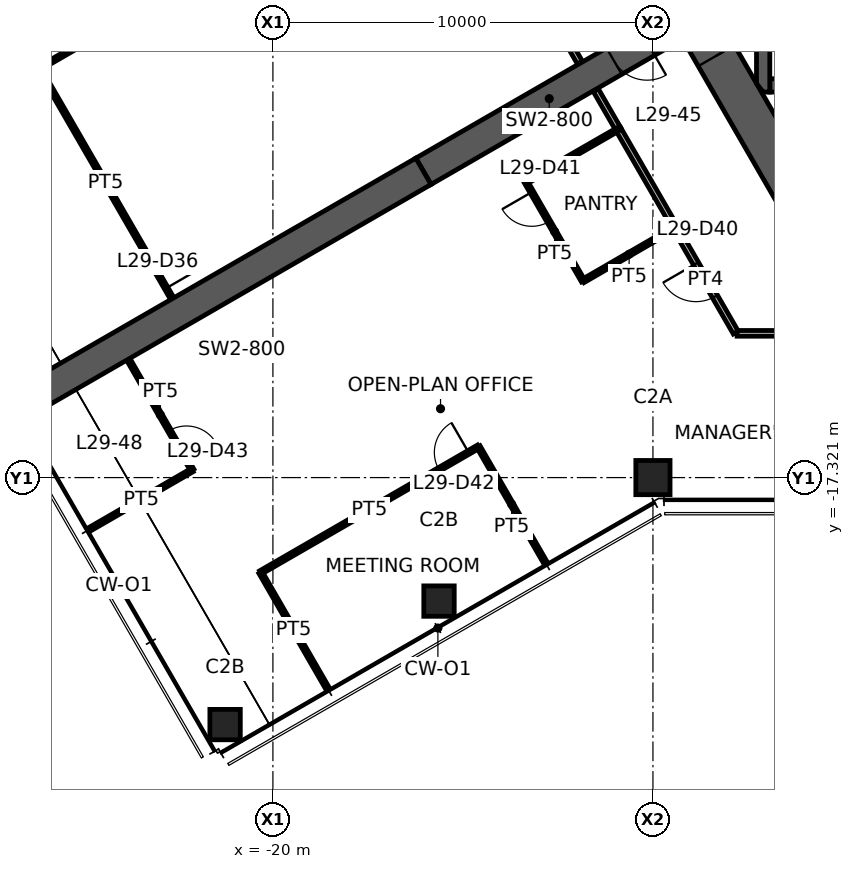
"""IFC4 building model, lengths in metres.
Left out: names, types, materials, properties, quantities, classifications, styles, units other than length and angle.
Written with IfcOpenShell. Run it as: python <this file> out.ifc"""

import sys

from ifc_helpers import new_model, si_unit, direction, frame, frame_2d, origin, origin_2d, place, context, subcontext, project, spatial, polyline, rectangle, hollow_rectangle, outline, extrude, element, fill, save


model = new_model("IFC4")
c1 = context("Model", 3, precision=1e-05, world=origin(), true_north=direction((0.0, 1.0)))
c2 = subcontext(c1, "Body", "Model", "MODEL_VIEW")
j1 = project(units=[si_unit("LENGTHUNIT", "METRE"), si_unit("PLANEANGLEUNIT", "RADIAN")], contexts=[c1])
p1 = place(None, origin())
s1 = spatial("IfcSite", under=j1, at=p1, CompositionType="ELEMENT")
p2 = place(p1, origin())
s2 = spatial("IfcBuilding", under=s1, at=p2, CompositionType="ELEMENT")
p3 = place(p2, frame((0.0, 0.0, 115.8)))
s3 = spatial("IfcBuildingStorey", under=s2, at=p3, CompositionType="ELEMENT", Elevation=115.8)
p4 = place(p3, frame((-10.0, -17.321, 0.0), z_axis=(0.0, 0.0, 1.0), x_axis=(1.0, 0.0, 0.0)))
e1 = element("IfcColumn", 1, at=p4, inside=s3, PredefinedType="COLUMN", context=c2, shape_type="SweptSolid", body=[
    extrude(hollow_rectangle(XDim=0.9, YDim=0.9, WallThickness=0.055, at=origin_2d()), origin(), (0.0, 0.0, 1.0), 3.9),
])
for number, where, z_axis, x_axis in (
    (2, (-15.629, -20.571, 0.0), (0.0, 0.0, 1.0), (1.0, 0.0, 0.0)),
    (3, (-21.258, -23.821, 0.0), (0.0, 0.0, 1.0), (1.0, 0.0, 0.0)),
):
    element("IfcColumn", number, at=place(p3, frame(where, z_axis=z_axis, x_axis=x_axis)), inside=s3, PredefinedType="COLUMN", context=c2, shape_type="SweptSolid", body=[
        extrude(hollow_rectangle(XDim=0.8, YDim=0.8, WallThickness=0.045, at=origin_2d()), origin(), (0.0, 0.0, 1.0), 3.9),
    ])
p5 = place(p3, frame((-11.922, 0.0, 0.0), z_axis=(0.0, 0.0, 1.0), x_axis=(0.500004296715, -0.866022923061, 0.0)))
e4 = element("IfcWall", 4, at=p5, inside=s3, PredefinedType="SHEAR", context=c2, shape_type="SweptSolid", body=[
    extrude(outline(polyline([(-0.318, -0.55), (6.381, -0.55), (7.181, -0.55), (12.24, -0.55), (11.605, 0.55), (7.181, 0.55), (6.381, 0.55), (0.318, 0.55), (-0.318, -0.55)])), origin(), (0.0, 0.0, 1.0), 3.9),
])
p6 = place(p5, frame((6.381, 0.0, 0.0)))
e5 = element("IfcOpeningElement", 5, at=p6, cuts=e4, PredefinedType="OPENING", context=c2, shape_type="SweptSolid", body=[
    extrude(rectangle(XDim=0.8, YDim=2.1, at=frame_2d((0.4, 1.05))), frame((0.0, 0.56, 0.0), z_axis=(0.0, -1.0, 0.0), x_axis=(1.0, 0.0, 0.0)), (0.0, 0.0, 1.0), 1.12),
])
p7 = place(p3, frame((-9.418, -5.438, 0.0), z_axis=(0.0, 0.0, 1.0), x_axis=(-0.866029782078, -0.499992416496, 0.0)))
e6 = element("IfcWall", 6, at=p7, inside=s3, PredefinedType="SHEAR", context=c2, shape_type="SweptSolid", body=[
    extrude(rectangle(XDim=7.646, YDim=0.8, at=frame_2d((3.823, 0.0))), origin(), (0.0, 0.0, 1.0), 3.9),
])
p8 = place(p7, frame((0.85, 0.0, 0.0)))
e7 = element("IfcOpeningElement", 7, at=p8, cuts=e6, PredefinedType="OPENING", context=c2, shape_type="SweptSolid", body=[
    extrude(rectangle(XDim=1.0, YDim=2.1, at=frame_2d((0.5, 1.05))), frame((0.0, 0.41, 0.0), z_axis=(0.0, -1.0, 0.0), x_axis=(1.0, 0.0, 0.0)), (0.0, 0.0, 1.0), 0.82),
])
p9 = place(p3, frame((-16.039, -9.26, 0.0), z_axis=(0.0, 0.0, 1.0), x_axis=(-0.866024837091, -0.50000098154, 0.0)))
e8 = element("IfcWall", 8, at=p9, inside=s3, PredefinedType="SHEAR", context=c2, shape_type="SweptSolid", body=[
    extrude(rectangle(XDim=13.0, YDim=0.8, at=frame_2d((6.5, 0.0))), origin(), (0.0, 0.0, 1.0), 3.9),
])
p10 = place(p3, frame((-6.925, -7.0, 0.0), z_axis=(0.0, 0.0, 1.0), x_axis=(1.0, 0.0, 0.0)))
e9 = element("IfcWall", 9, at=p10, inside=s3, PredefinedType="SHEAR", context=c2, shape_type="SweptSolid", body=[
    extrude(rectangle(XDim=2.25, YDim=0.35, at=frame_2d((1.125, 0.0))), origin(), (0.0, 0.0, 1.0), 3.9),
])
p11 = place(p3, frame((-7.1, -3.775, 0.0), z_axis=(0.0, 0.0, 1.0), x_axis=(0.0, -1.0, 0.0)))
e10 = element("IfcWall", 10, at=p11, inside=s3, PredefinedType="SHEAR", context=c2, shape_type="SweptSolid", body=[
    extrude(outline(polyline([(0.0, -0.175), (3.175, -0.175), (3.4, 0.0), (3.4, 0.175), (0.0, 0.175), (0.0, -0.175)])), origin(), (0.0, 0.0, 1.0), 3.9),
])
p12 = place(p3, frame((-11.923, -6.399, 0.0), z_axis=(0.0, 0.0, 1.0), x_axis=(-0.499980837837, 0.866036466782, 0.0)))
e11 = element("IfcWall", 11, at=p12, inside=s3, PredefinedType="PARTITIONING", context=c2, shape_type="SweptSolid", body=[
    extrude(rectangle(XDim=7.388, YDim=0.15, at=frame_2d((3.694, 0.0))), origin(), (0.0, 0.0, 1.0), 2.95),
])
p13 = place(p12, frame((3.194, 0.0, 0.0)))
e12 = element("IfcOpeningElement", 12, at=p13, cuts=e11, PredefinedType="OPENING", context=c2, shape_type="SweptSolid", body=[
    extrude(rectangle(XDim=1.0, YDim=2.1, at=frame_2d((0.5, 1.05))), frame((0.0, 0.085, 0.0), z_axis=(0.0, -1.0, 0.0), x_axis=(1.0, 0.0, 0.0)), (0.0, 0.0, 1.0), 0.17),
])
p14 = place(p3, frame((-26.151, -6.554, 0.0), z_axis=(0.0, 0.0, 1.0), x_axis=(0.500528756763, -0.865719910625, 0.0)))
e13 = element("IfcWall", 13, at=p14, inside=s3, PredefinedType="PARTITIONING", context=c2, shape_type="SweptSolid", body=[
    extrude(rectangle(XDim=6.979, YDim=0.1, at=frame_2d((3.49, 0.0))), origin(), (0.0, 0.0, 1.0), 2.95),
])
p15 = place(p14, frame((5.78, 0.0, 0.0)))
e14 = element("IfcOpeningElement", 14, at=p15, cuts=e13, PredefinedType="OPENING", context=c2, shape_type="SweptSolid", body=[
    extrude(rectangle(XDim=0.9, YDim=2.1, at=frame_2d((0.45, 1.05))), frame((0.0, 0.06, 0.0), z_axis=(0.0, -1.0, 0.0), x_axis=(1.0, 0.0, 0.0)), (0.0, 0.0, 1.0), 0.12),
])
p16 = place(p3, frame((-21.792, -4.037, 0.0), z_axis=(0.0, 0.0, 1.0), x_axis=(-0.866037775365, -0.499978571182, 0.0)))
e15 = element("IfcWall", 15, at=p16, inside=s3, PredefinedType="PARTITIONING", context=c2, shape_type="SweptSolid", body=[
    extrude(rectangle(XDim=5.033, YDim=0.1, at=frame_2d((2.517, 0.0))), origin(), (0.0, 0.0, 1.0), 2.95),
])
p17 = place(p16, frame((0.3, 0.0, 0.0)))
e16 = element("IfcOpeningElement", 16, at=p17, cuts=e15, PredefinedType="OPENING", context=c2, shape_type="SweptSolid", body=[
    extrude(rectangle(XDim=0.9, YDim=2.1, at=frame_2d((0.45, 1.05))), frame((0.0, 0.06, 0.0), z_axis=(0.0, -1.0, 0.0), x_axis=(1.0, 0.0, 0.0)), (0.0, 0.0, 1.0), 0.12),
])
p18 = place(p3, frame((-9.41, -10.75, 0.0), z_axis=(0.0, 0.0, 1.0), x_axis=(-0.500038395149, 0.8660032352, 0.0)))
e17 = element("IfcWall", 17, at=p18, inside=s3, PredefinedType="PARTITIONING", context=c2, shape_type="SweptSolid", body=[
    extrude(rectangle(XDim=3.01, YDim=0.15, at=frame_2d((1.505, 0.0))), origin(), (0.0, 0.0, 1.0), 2.95),
])
p19 = place(p3, frame((-10.911, -8.152, 0.0), z_axis=(0.0, 0.0, 1.0), x_axis=(-0.499841408252, 0.866116947413, 0.0)))
e18 = element("IfcWall", 18, at=p19, inside=s3, PredefinedType="PARTITIONING", context=c2, shape_type="SweptSolid", body=[
    extrude(rectangle(XDim=1.185, YDim=0.15, at=frame_2d((0.592, 0.0))), origin(), (0.0, 0.0, 1.0), 2.95),
])
p20 = place(p3, frame((-7.82, -13.505, 0.0), z_axis=(0.0, 0.0, 1.0), x_axis=(-0.499983030129, 0.866035201123, 0.0)))
e19 = element("IfcWall", 19, at=p20, inside=s3, PredefinedType="PARTITIONING", context=c2, shape_type="SweptSolid", body=[
    extrude(rectangle(XDim=3.19, YDim=0.15, at=frame_2d((1.595, 0.0))), origin(), (0.0, 0.0, 1.0), 2.95),
])
p21 = place(p20, frame((1.095, 0.0, 0.0)))
e20 = element("IfcOpeningElement", 20, at=p21, cuts=e19, PredefinedType="OPENING", context=c2, shape_type="SweptSolid", body=[
    extrude(rectangle(XDim=1.0, YDim=2.1, at=frame_2d((0.5, 1.05))), frame((0.0, 0.085, 0.0), z_axis=(0.0, -1.0, 0.0), x_axis=(1.0, 0.0, 0.0)), (0.0, 0.0, 1.0), 0.17),
])
p22 = place(p3, frame((-13.338, -9.548, 0.0), z_axis=(0.0, 0.0, 1.0), x_axis=(0.866833758708, 0.498597267105, 0.0)))
e21 = element("IfcWall", 21, at=p22, inside=s3, PredefinedType="PARTITIONING", context=c2, shape_type="SweptSolid", body=[
    extrude(rectangle(XDim=2.8, YDim=0.1, at=frame_2d((1.4, 0.0))), origin(), (0.0, 0.0, 1.0), 2.95),
])
p23 = place(p3, frame((-11.838, -12.146, 0.0), z_axis=(0.0, 0.0, 1.0), x_axis=(-0.499990139034, 0.866031096941, 0.0)))
e22 = element("IfcWall", 22, at=p23, inside=s3, PredefinedType="PARTITIONING", context=c2, shape_type="SweptSolid", body=[
    extrude(rectangle(XDim=3.0, YDim=0.1, at=frame_2d((1.5, 0.0))), origin(), (0.0, 0.0, 1.0), 2.95),
])
p24 = place(p23, frame((1.8, 0.0, 0.0)))
e23 = element("IfcOpeningElement", 23, at=p24, cuts=e22, PredefinedType="OPENING", context=c2, shape_type="SweptSolid", body=[
    extrude(rectangle(XDim=0.9, YDim=2.1, at=frame_2d((0.45, 1.05))), frame((0.0, 0.06, 0.0), z_axis=(0.0, -1.0, 0.0), x_axis=(1.0, 0.0, 0.0)), (0.0, 0.0, 1.0), 0.12),
])
p25 = place(p3, frame((-9.415, -10.742, 0.0), z_axis=(0.0, 0.0, 1.0), x_axis=(-0.865195372903, -0.501434907746, 0.0)))
e24 = element("IfcWall", 24, at=p25, inside=s3, PredefinedType="PARTITIONING", context=c2, shape_type="SweptSolid", body=[
    extrude(rectangle(XDim=2.8, YDim=0.1, at=frame_2d((1.4, 0.0))), origin(), (0.0, 0.0, 1.0), 2.95),
])
p26 = place(p3, frame((-20.325, -19.817, 0.0), z_axis=(0.0, 0.0, 1.0), x_axis=(0.866037567856, 0.499978930619, 0.0)))
e25 = element("IfcWall", 25, at=p26, inside=s3, PredefinedType="PARTITIONING", context=c2, shape_type="SweptSolid", body=[
    extrude(rectangle(XDim=6.619, YDim=0.1, at=frame_2d((3.31, 0.0))), origin(), (0.0, 0.0, 1.0), 2.95),
])
p27 = place(p26, frame((5.42, 0.0, 0.0)))
e26 = element("IfcOpeningElement", 26, at=p27, cuts=e25, PredefinedType="OPENING", context=c2, shape_type="SweptSolid", body=[
    extrude(rectangle(XDim=0.9, YDim=2.1, at=frame_2d((0.45, 1.05))), frame((0.0, 0.06, 0.0), z_axis=(0.0, -1.0, 0.0), x_axis=(1.0, 0.0, 0.0)), (0.0, 0.0, 1.0), 0.12),
])
p28 = place(p3, frame((-18.585, -22.831, 0.0), z_axis=(0.0, 0.0, 1.0), x_axis=(-0.499979528911, 0.866037222451, 0.0)))
e27 = element("IfcWall", 27, at=p28, inside=s3, PredefinedType="PARTITIONING", context=c2, shape_type="SweptSolid", body=[
    extrude(rectangle(XDim=3.48, YDim=0.1, at=frame_2d((1.74, 0.0))), origin(), (0.0, 0.0, 1.0), 2.95),
])
p29 = place(p3, frame((-14.592, -16.508, 0.0), z_axis=(0.0, 0.0, 1.0), x_axis=(0.500010275428, -0.866019471182, 0.0)))
e28 = element("IfcWall", 28, at=p29, inside=s3, PredefinedType="PARTITIONING", context=c2, shape_type="SweptSolid", body=[
    extrude(rectangle(XDim=3.5, YDim=0.1, at=frame_2d((1.75, 0.0))), origin(), (0.0, 0.0, 1.0), 2.95),
])
p30 = place(p3, frame((-23.797, -14.224, 0.0), z_axis=(0.0, 0.0, 1.0), x_axis=(0.500015043844, -0.866016718043, 0.0)))
e29 = element("IfcWall", 29, at=p30, inside=s3, PredefinedType="PARTITIONING", context=c2, shape_type="SweptSolid", body=[
    extrude(rectangle(XDim=3.347, YDim=0.1, at=frame_2d((1.673, 0.0))), origin(), (0.0, 0.0, 1.0), 2.95),
])
p31 = place(p30, frame((2.147, 0.0, 0.0)))
e30 = element("IfcOpeningElement", 30, at=p31, cuts=e29, PredefinedType="OPENING", context=c2, shape_type="SweptSolid", body=[
    extrude(rectangle(XDim=0.9, YDim=2.1, at=frame_2d((0.45, 1.05))), frame((0.0, 0.06, 0.0), z_axis=(0.0, -1.0, 0.0), x_axis=(1.0, 0.0, 0.0)), (0.0, 0.0, 1.0), 0.12),
])
p32 = place(p3, frame((-22.123, -17.122, 0.0), z_axis=(0.0, 0.0, 1.0), x_axis=(-0.86602952684, -0.49999285859, 0.0)))
e31 = element("IfcWall", 31, at=p32, inside=s3, PredefinedType="PARTITIONING", context=c2, shape_type="SweptSolid", body=[
    extrude(rectangle(XDim=3.1, YDim=0.1, at=frame_2d((1.55, 0.0))), origin(), (0.0, 0.0, 1.0), 2.95),
])
p33 = place(p3, frame((-3.241, -13.525, 0.0), z_axis=(0.0, 0.0, 1.0), x_axis=(-1.0, 0.0, 0.0)))
e32 = element("IfcWall", 32, at=p33, inside=s3, PredefinedType="PARTITIONING", context=c2, shape_type="SweptSolid", body=[
    extrude(rectangle(XDim=4.544, YDim=0.15, at=frame_2d((2.272, 0.0))), origin(), (0.0, 0.0, 1.0), 2.95),
])
p34 = place(p6, origin())
e33 = element("IfcDoor", 33, at=p34, inside=s3, OperationType="SINGLE_SWING_RIGHT", PredefinedType="DOOR", context=c2, shape_type="SweptSolid", body=[
    extrude(rectangle(XDim=0.8, YDim=2.1, at=frame_2d((0.4, 1.05))), frame((0.0, 0.025, 0.0), z_axis=(0.0, -1.0, 0.0), x_axis=(1.0, 0.0, 0.0)), (0.0, 0.0, 1.0), 0.05),
])
fill(e5, e33)
p35 = place(p8, origin())
e34 = element("IfcDoor", 34, at=p35, inside=s3, OperationType="SINGLE_SWING_LEFT", PredefinedType="DOOR", context=c2, shape_type="SweptSolid", body=[
    extrude(rectangle(XDim=1.0, YDim=2.1, at=frame_2d((0.5, 1.05))), frame((0.0, 0.025, 0.0), z_axis=(0.0, -1.0, 0.0), x_axis=(1.0, 0.0, 0.0)), (0.0, 0.0, 1.0), 0.05),
])
fill(e7, e34)
p36 = place(p15, origin())
e35 = element("IfcDoor", 35, at=p36, inside=s3, OperationType="SINGLE_SWING_RIGHT", PredefinedType="DOOR", context=c2, shape_type="SweptSolid", body=[
    extrude(rectangle(XDim=0.9, YDim=2.1, at=frame_2d((0.45, 1.05))), frame((0.0, 0.025, 0.0), z_axis=(0.0, -1.0, 0.0), x_axis=(1.0, 0.0, 0.0)), (0.0, 0.0, 1.0), 0.05),
])
fill(e14, e35)
p37 = place(p21, origin())
e36 = element("IfcDoor", 36, at=p37, inside=s3, OperationType="SINGLE_SWING_RIGHT", PredefinedType="DOOR", context=c2, shape_type="SweptSolid", body=[
    extrude(rectangle(XDim=1.0, YDim=2.1, at=frame_2d((0.5, 1.05))), frame((0.0, 0.025, 0.0), z_axis=(0.0, -1.0, 0.0), x_axis=(1.0, 0.0, 0.0)), (0.0, 0.0, 1.0), 0.05),
])
fill(e20, e36)
p38 = place(p24, origin())
e37 = element("IfcDoor", 37, at=p38, inside=s3, OperationType="SINGLE_SWING_RIGHT", PredefinedType="DOOR", context=c2, shape_type="SweptSolid", body=[
    extrude(rectangle(XDim=0.9, YDim=2.1, at=frame_2d((0.45, 1.05))), frame((0.0, 0.025, 0.0), z_axis=(0.0, -1.0, 0.0), x_axis=(1.0, 0.0, 0.0)), (0.0, 0.0, 1.0), 0.05),
])
fill(e23, e37)
p39 = place(p27, origin())
e38 = element("IfcDoor", 38, at=p39, inside=s3, OperationType="SINGLE_SWING_RIGHT", PredefinedType="DOOR", context=c2, shape_type="SweptSolid", body=[
    extrude(rectangle(XDim=0.9, YDim=2.1, at=frame_2d((0.45, 1.05))), frame((0.0, 0.025, 0.0), z_axis=(0.0, -1.0, 0.0), x_axis=(1.0, 0.0, 0.0)), (0.0, 0.0, 1.0), 0.05),
])
fill(e26, e38)
p40 = place(p31, origin())
e39 = element("IfcDoor", 39, at=p40, inside=s3, OperationType="SINGLE_SWING_RIGHT", PredefinedType="DOOR", context=c2, shape_type="SweptSolid", body=[
    extrude(rectangle(XDim=0.9, YDim=2.1, at=frame_2d((0.45, 1.05))), frame((0.0, 0.025, 0.0), z_axis=(0.0, -1.0, 0.0), x_axis=(1.0, 0.0, 0.0)), (0.0, 0.0, 1.0), 0.05),
])
fill(e30, e39)
save(model, sys.argv[1])
